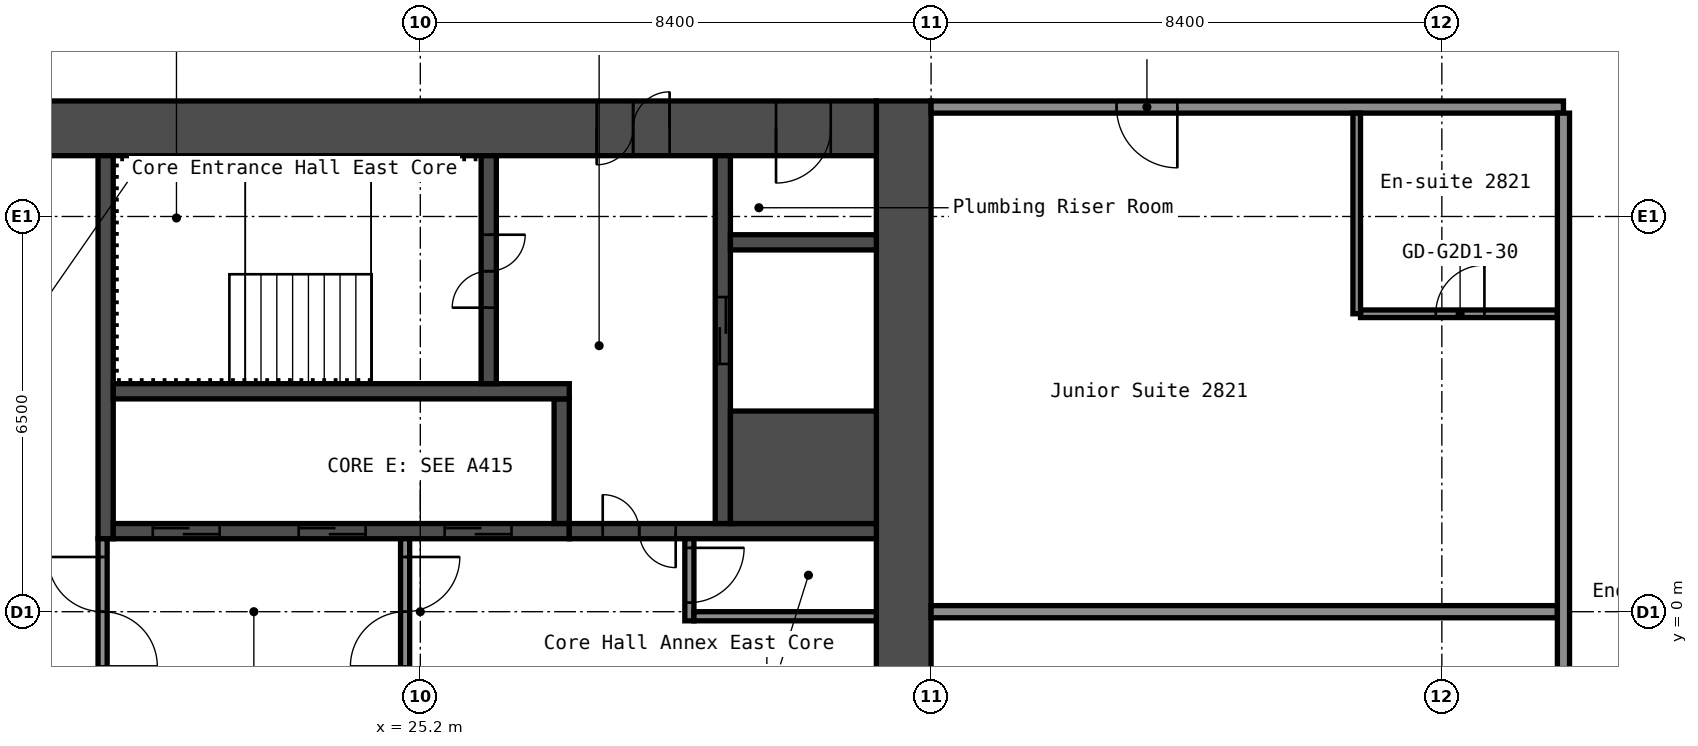
"""IFC4 building model, lengths in metres.
Left out: names, types, materials, properties, quantities, classifications, styles, units other than length and angle.
Written with IfcOpenShell. Run it as: python <this file> out.ifc"""

import sys

from ifc_helpers import new_model, si_unit, direction, frame, frame_2d, origin, place, context, subcontext, project, spatial, rectangle, extrude, element, fill, save


model = new_model("IFC4")
c1 = context("Model", 3, precision=1e-05, world=origin(), true_north=direction((0.0, 1.0)))
c2 = subcontext(c1, "Body", "Model", "MODEL_VIEW")
j1 = project(units=[si_unit("LENGTHUNIT", "METRE"), si_unit("PLANEANGLEUNIT", "RADIAN")], contexts=[c1])
p1 = place(None, origin())
s1 = spatial("IfcSite", under=j1, at=p1, CompositionType="ELEMENT")
p2 = place(p1, origin())
s2 = spatial("IfcBuilding", under=s1, at=p2, CompositionType="ELEMENT")
p3 = place(p2, frame((0.0, 0.0, 101.0)))
s3 = spatial("IfcBuildingStorey", under=s2, at=p3, CompositionType="ELEMENT", Elevation=101.0)
p4 = place(p3, frame((33.15, -8.4, 0.0), z_axis=(0.0, 0.0, 1.0), x_axis=(0.0, 1.0, 0.0)))
e1 = element("IfcWall", 1, at=p4, inside=s3, PredefinedType="SHEAR", context=c2, shape_type="SweptSolid", body=[
    extrude(rectangle(XDim=16.8, YDim=0.9, at=frame_2d((8.4, 0.0))), origin(), (0.0, 0.0, 1.0), 2.8),
])
p5 = place(p3, frame((17.7, 7.95, 0.0), z_axis=(0.0, 0.0, 1.0), x_axis=(1.0, 0.0, 0.0)))
e2 = element("IfcWall", 2, at=p5, inside=s3, PredefinedType="SHEAR", context=c2, shape_type="SweptSolid", body=[
    extrude(rectangle(XDim=15.0, YDim=0.9, at=frame_2d((7.5, 0.0))), origin(), (0.0, 0.0, 1.0), 2.8),
])
p6 = place(p5, frame((10.4, 0.0, 0.0)))
e3 = element("IfcOpeningElement", 3, at=p6, cuts=e2, PredefinedType="OPENING", context=c2, shape_type="SweptSolid", body=[
    extrude(rectangle(XDim=1.2, YDim=2.1, at=frame_2d((0.6, 1.05))), frame((0.0, 0.46, 0.0), z_axis=(0.0, -1.0, 0.0), x_axis=(1.0, 0.0, 0.0)), (0.0, 0.0, 1.0), 0.92),
])
p7 = place(p5, frame((13.35, 0.0, 0.0)))
e4 = element("IfcOpeningElement", 4, at=p7, cuts=e2, PredefinedType="OPENING", context=c2, shape_type="SweptSolid", body=[
    extrude(rectangle(XDim=0.9, YDim=2.1, at=frame_2d((0.45, 1.05))), frame((0.0, 0.46, 0.0), z_axis=(0.0, -1.0, 0.0), x_axis=(1.0, 0.0, 0.0)), (0.0, 0.0, 1.0), 0.92),
])
p8 = place(p3, frame((20.025, 1.2, 0.0), z_axis=(0.0, 0.0, 1.0), x_axis=(0.0, 1.0, 0.0)))
e5 = element("IfcWall", 5, at=p8, inside=s3, PredefinedType="SHEAR", context=c2, shape_type="SweptSolid", body=[
    extrude(rectangle(XDim=6.3, YDim=0.25, at=frame_2d((3.15, 0.0))), origin(), (0.0, 0.0, 1.0), 2.8),
])
p9 = place(p3, frame((20.15, 1.325, 0.0), z_axis=(0.0, 0.0, 1.0), x_axis=(1.0, 0.0, 0.0)))
e6 = element("IfcWall", 6, at=p9, inside=s3, PredefinedType="SHEAR", context=c2, shape_type="SweptSolid", body=[
    extrude(rectangle(XDim=7.5, YDim=0.25, at=frame_2d((3.75, 0.0))), origin(), (0.0, 0.0, 1.0), 2.8),
])
p10 = place(p9, frame((0.65, 0.0, 0.0)))
e7 = element("IfcOpeningElement", 7, at=p10, cuts=e6, PredefinedType="OPENING", context=c2, shape_type="SweptSolid", body=[
    extrude(rectangle(XDim=1.1, YDim=2.1, at=frame_2d((0.55, 1.05))), frame((0.0, 0.135, 0.0), z_axis=(0.0, -1.0, 0.0), x_axis=(1.0, 0.0, 0.0)), (0.0, 0.0, 1.0), 0.27),
])
p11 = place(p9, frame((3.05, 0.0, 0.0)))
e8 = element("IfcOpeningElement", 8, at=p11, cuts=e6, PredefinedType="OPENING", context=c2, shape_type="SweptSolid", body=[
    extrude(rectangle(XDim=1.1, YDim=2.1, at=frame_2d((0.55, 1.05))), frame((0.0, 0.135, 0.0), z_axis=(0.0, -1.0, 0.0), x_axis=(1.0, 0.0, 0.0)), (0.0, 0.0, 1.0), 0.27),
])
p12 = place(p9, frame((5.45, 0.0, 0.0)))
e9 = element("IfcOpeningElement", 9, at=p12, cuts=e6, PredefinedType="OPENING", context=c2, shape_type="SweptSolid", body=[
    extrude(rectangle(XDim=1.1, YDim=2.1, at=frame_2d((0.55, 1.05))), frame((0.0, 0.135, 0.0), z_axis=(0.0, -1.0, 0.0), x_axis=(1.0, 0.0, 0.0)), (0.0, 0.0, 1.0), 0.27),
])
p13 = place(p3, frame((27.525, 1.45, 0.0), z_axis=(0.0, 0.0, 1.0), x_axis=(0.0, 1.0, 0.0)))
e10 = element("IfcWall", 10, at=p13, inside=s3, PredefinedType="SHEAR", context=c2, shape_type="SweptSolid", body=[
    extrude(rectangle(XDim=2.05, YDim=0.25, at=frame_2d((1.025, 0.0))), origin(), (0.0, 0.0, 1.0), 2.8),
])
p14 = place(p3, frame((20.15, 3.625, 0.0), z_axis=(0.0, 0.0, 1.0), x_axis=(1.0, 0.0, 0.0)))
e11 = element("IfcWall", 11, at=p14, inside=s3, PredefinedType="SHEAR", context=c2, shape_type="SweptSolid", body=[
    extrude(rectangle(XDim=7.5, YDim=0.25, at=frame_2d((3.75, 0.0))), origin(), (0.0, 0.0, 1.0), 2.8),
])
p15 = place(p3, frame((26.325, 3.75, 0.0), z_axis=(0.0, 0.0, 1.0), x_axis=(0.0, 1.0, 0.0)))
e12 = element("IfcWall", 12, at=p15, inside=s3, PredefinedType="SHEAR", context=c2, shape_type="SweptSolid", body=[
    extrude(rectangle(XDim=3.75, YDim=0.25, at=frame_2d((1.875, 0.0))), origin(), (0.0, 0.0, 1.0), 2.8),
])
p16 = place(p15, frame((1.25, 0.0, 0.0)))
e13 = element("IfcOpeningElement", 13, at=p16, cuts=e12, PredefinedType="OPENING", context=c2, shape_type="SweptSolid", body=[
    extrude(rectangle(XDim=1.2, YDim=2.1, at=frame_2d((0.6, 1.05))), frame((0.0, 0.135, 0.0), z_axis=(0.0, -1.0, 0.0), x_axis=(1.0, 0.0, 0.0)), (0.0, 0.0, 1.0), 0.27),
])
p17 = place(p3, frame((27.65, 1.325, 0.0), z_axis=(0.0, 0.0, 1.0), x_axis=(1.0, 0.0, 0.0)))
e14 = element("IfcWall", 14, at=p17, inside=s3, PredefinedType="SHEAR", context=c2, shape_type="SweptSolid", body=[
    extrude(rectangle(XDim=5.05, YDim=0.25, at=frame_2d((2.525, 0.0))), origin(), (0.0, 0.0, 1.0), 2.8),
])
p18 = place(p17, frame((0.55, 0.0, 0.0)))
e15 = element("IfcOpeningElement", 15, at=p18, cuts=e14, PredefinedType="OPENING", context=c2, shape_type="SweptSolid", body=[
    extrude(rectangle(XDim=1.2, YDim=2.1, at=frame_2d((0.6, 1.05))), frame((0.0, 0.135, 0.0), z_axis=(0.0, -1.0, 0.0), x_axis=(1.0, 0.0, 0.0)), (0.0, 0.0, 1.0), 0.27),
])
p19 = place(p3, frame((30.175, 1.45, 0.0), z_axis=(0.0, 0.0, 1.0), x_axis=(0.0, 1.0, 0.0)))
e16 = element("IfcWall", 16, at=p19, inside=s3, PredefinedType="SHEAR", context=c2, shape_type="SweptSolid", body=[
    extrude(rectangle(XDim=6.05, YDim=0.25, at=frame_2d((3.025, 0.0))), origin(), (0.0, 0.0, 1.0), 2.8),
])
p20 = place(p19, frame((2.625, 0.0, 0.0)))
e17 = element("IfcOpeningElement", 17, at=p20, cuts=e16, PredefinedType="OPENING", context=c2, shape_type="SweptSolid", body=[
    extrude(rectangle(XDim=1.1, YDim=2.1, at=frame_2d((0.55, 1.05))), frame((0.0, 0.135, 0.0), z_axis=(0.0, -1.0, 0.0), x_axis=(1.0, 0.0, 0.0)), (0.0, 0.0, 1.0), 0.27),
])
p21 = place(p3, frame((30.3, 2.375, 0.0), z_axis=(0.0, 0.0, 1.0), x_axis=(1.0, 0.0, 0.0)))
e18 = element("IfcWall", 18, at=p21, inside=s3, PredefinedType="SHEAR", context=c2, shape_type="SweptSolid", body=[
    extrude(rectangle(XDim=2.4, YDim=1.85, at=frame_2d((1.2, 0.0))), origin(), (0.0, 0.0, 1.0), 2.8),
])
p22 = place(p3, frame((30.3, 6.075, 0.0), z_axis=(0.0, 0.0, 1.0), x_axis=(1.0, 0.0, 0.0)))
e19 = element("IfcWall", 19, at=p22, inside=s3, PredefinedType="SHEAR", context=c2, shape_type="SweptSolid", body=[
    extrude(rectangle(XDim=2.4, YDim=0.25, at=frame_2d((1.2, 0.0))), origin(), (0.0, 0.0, 1.0), 2.8),
])
p23 = place(p3, frame((19.975, -1.2, 0.0), z_axis=(0.0, 0.0, 1.0), x_axis=(0.0, 1.0, 0.0)))
e20 = element("IfcWall", 20, at=p23, inside=s3, PredefinedType="PARTITIONING", context=c2, shape_type="SweptSolid", body=[
    extrude(rectangle(XDim=2.4, YDim=0.15, at=frame_2d((1.2, 0.0))), origin(), (0.0, 0.0, 1.0), 2.8),
])
p24 = place(p23, frame((0.3, 0.0, 0.0)))
e21 = element("IfcOpeningElement", 21, at=p24, cuts=e20, PredefinedType="OPENING", context=c2, shape_type="SweptSolid", body=[
    extrude(rectangle(XDim=1.8, YDim=2.1, at=frame_2d((0.9, 1.05))), frame((0.0, 0.085, 0.0), z_axis=(0.0, -1.0, 0.0), x_axis=(1.0, 0.0, 0.0)), (0.0, 0.0, 1.0), 0.17),
])
p25 = place(p3, frame((24.95, -1.2, 0.0), z_axis=(0.0, 0.0, 1.0), x_axis=(0.0, 1.0, 0.0)))
e22 = element("IfcWall", 22, at=p25, inside=s3, PredefinedType="PARTITIONING", context=c2, shape_type="SweptSolid", body=[
    extrude(rectangle(XDim=2.4, YDim=0.15, at=frame_2d((1.2, 0.0))), origin(), (0.0, 0.0, 1.0), 2.8),
])
p26 = place(p25, frame((0.3, 0.0, 0.0)))
e23 = element("IfcOpeningElement", 23, at=p26, cuts=e22, PredefinedType="OPENING", context=c2, shape_type="SweptSolid", body=[
    extrude(rectangle(XDim=1.8, YDim=2.1, at=frame_2d((0.9, 1.05))), frame((0.0, 0.085, 0.0), z_axis=(0.0, -1.0, 0.0), x_axis=(1.0, 0.0, 0.0)), (0.0, 0.0, 1.0), 0.17),
])
p27 = place(p3, frame((29.625, -0.15, 0.0), z_axis=(0.0, 0.0, 1.0), x_axis=(0.0, 1.0, 0.0)))
e24 = element("IfcWall", 24, at=p27, inside=s3, PredefinedType="PARTITIONING", context=c2, shape_type="SweptSolid", body=[
    extrude(rectangle(XDim=1.35, YDim=0.15, at=frame_2d((0.675, 0.0))), origin(), (0.0, 0.0, 1.0), 2.8),
])
p28 = place(p27, frame((0.3, 0.0, 0.0)))
e25 = element("IfcOpeningElement", 25, at=p28, cuts=e24, PredefinedType="OPENING", context=c2, shape_type="SweptSolid", body=[
    extrude(rectangle(XDim=0.9, YDim=2.1, at=frame_2d((0.45, 1.05))), frame((0.0, 0.085, 0.0), z_axis=(0.0, -1.0, 0.0), x_axis=(1.0, 0.0, 0.0)), (0.0, 0.0, 1.0), 0.17),
])
p29 = place(p3, frame((29.7, -0.075, 0.0), z_axis=(0.0, 0.0, 1.0), x_axis=(1.0, 0.0, 0.0)))
e26 = element("IfcWall", 26, at=p29, inside=s3, PredefinedType="PARTITIONING", context=c2, shape_type="SweptSolid", body=[
    extrude(rectangle(XDim=3.0, YDim=0.15, at=frame_2d((1.5, 0.0))), origin(), (0.0, 0.0, 1.0), 2.8),
])
p30 = place(p3, frame((33.6, 0.0, 0.0), z_axis=(0.0, 0.0, 1.0), x_axis=(1.0, 0.0, 0.0)))
e27 = element("IfcWall", 27, at=p30, inside=s3, PredefinedType="PARTITIONING", context=c2, shape_type="SweptSolid", body=[
    extrude(rectangle(XDim=10.3, YDim=0.2, at=frame_2d((5.15, 0.0))), origin(), (0.0, 0.0, 1.0), 2.8),
])
p31 = place(p3, frame((40.663, 4.9, 0.0), z_axis=(0.0, 0.0, 1.0), x_axis=(1.0, 0.0, 0.0)))
e28 = element("IfcWall", 28, at=p31, inside=s3, PredefinedType="PARTITIONING", context=c2, shape_type="SweptSolid", body=[
    extrude(rectangle(XDim=3.237, YDim=0.125, at=frame_2d((1.619, 0.0))), origin(), (0.0, 0.0, 1.0), 2.8),
])
p32 = place(p31, frame((1.238, 0.0, 0.0)))
e29 = element("IfcOpeningElement", 29, at=p32, cuts=e28, PredefinedType="OPENING", context=c2, shape_type="SweptSolid", body=[
    extrude(rectangle(XDim=0.8, YDim=2.1, at=frame_2d((0.4, 1.05))), frame((0.0, 0.073, 0.0), z_axis=(0.0, -1.0, 0.0), x_axis=(1.0, 0.0, 0.0)), (0.0, 0.0, 1.0), 0.145),
])
p33 = place(p3, frame((33.6, 8.3, 0.0), z_axis=(0.0, 0.0, 1.0), x_axis=(1.0, 0.0, 0.0)))
e30 = element("IfcWall", 30, at=p33, inside=s3, PredefinedType="PARTITIONING", context=c2, shape_type="SweptSolid", body=[
    extrude(rectangle(XDim=10.4, YDim=0.2, at=frame_2d((5.2, 0.0))), origin(), (0.0, 0.0, 1.0), 2.8),
])
p34 = place(p33, frame((3.05, 0.0, 0.0)))
e31 = element("IfcOpeningElement", 31, at=p34, cuts=e30, PredefinedType="OPENING", context=c2, shape_type="SweptSolid", body=[
    extrude(rectangle(XDim=1.0, YDim=2.1, at=frame_2d((0.5, 1.05))), frame((0.0, 0.11, 0.0), z_axis=(0.0, -1.0, 0.0), x_axis=(1.0, 0.0, 0.0)), (0.0, 0.0, 1.0), 0.22),
])
p35 = place(p3, frame((40.6, 4.9, 0.0), z_axis=(0.0, 0.0, 1.0), x_axis=(0.0, 1.0, 0.0)))
e32 = element("IfcWall", 32, at=p35, inside=s3, PredefinedType="PARTITIONING", context=c2, shape_type="SweptSolid", body=[
    extrude(rectangle(XDim=3.3, YDim=0.125, at=frame_2d((1.65, 0.0))), origin(), (0.0, 0.0, 1.0), 2.8),
])
p36 = place(p3, frame((44.0, -8.2, 0.0), z_axis=(0.0, 0.0, 1.0), x_axis=(0.0, 1.0, 0.0)))
e33 = element("IfcWall", 33, at=p36, inside=s3, PredefinedType="PARTITIONING", context=c2, shape_type="SweptSolid", body=[
    extrude(rectangle(XDim=16.4, YDim=0.2, at=frame_2d((8.2, 0.0))), origin(), (0.0, 0.0, 1.0), 2.8),
])
p37 = place(p6, origin())
e34 = element("IfcDoor", 34, at=p37, inside=s3, OperationType="DOUBLE_DOOR_SINGLE_SWING", PredefinedType="DOOR", context=c2, shape_type="SweptSolid", body=[
    extrude(rectangle(XDim=1.2, YDim=2.1, at=frame_2d((0.6, 1.05))), frame((0.0, 0.025, 0.0), z_axis=(0.0, -1.0, 0.0), x_axis=(1.0, 0.0, 0.0)), (0.0, 0.0, 1.0), 0.05),
])
fill(e3, e34)
p38 = place(p7, origin())
e35 = element("IfcDoor", 35, at=p38, inside=s3, OperationType="SINGLE_SWING_LEFT", PredefinedType="DOOR", context=c2, shape_type="SweptSolid", body=[
    extrude(rectangle(XDim=0.9, YDim=2.1, at=frame_2d((0.45, 1.05))), frame((0.0, 0.025, 0.0), z_axis=(0.0, -1.0, 0.0), x_axis=(1.0, 0.0, 0.0)), (0.0, 0.0, 1.0), 0.05),
])
fill(e4, e35)
p39 = place(p16, origin())
e36 = element("IfcDoor", 36, at=p39, inside=s3, OperationType="DOUBLE_DOOR_SINGLE_SWING", PredefinedType="DOOR", context=c2, shape_type="SweptSolid", body=[
    extrude(rectangle(XDim=1.2, YDim=2.1, at=frame_2d((0.6, 1.05))), frame((0.0, 0.025, 0.0), z_axis=(0.0, -1.0, 0.0), x_axis=(1.0, 0.0, 0.0)), (0.0, 0.0, 1.0), 0.05),
])
fill(e13, e36)
p40 = place(p18, origin())
e37 = element("IfcDoor", 37, at=p40, inside=s3, OperationType="DOUBLE_DOOR_SINGLE_SWING", PredefinedType="DOOR", context=c2, shape_type="SweptSolid", body=[
    extrude(rectangle(XDim=1.2, YDim=2.1, at=frame_2d((0.6, 1.05))), frame((0.0, 0.025, 0.0), z_axis=(0.0, -1.0, 0.0), x_axis=(1.0, 0.0, 0.0)), (0.0, 0.0, 1.0), 0.05),
])
fill(e15, e37)
p41 = place(p24, origin())
e38 = element("IfcDoor", 38, at=p41, inside=s3, OperationType="DOUBLE_DOOR_SINGLE_SWING", PredefinedType="DOOR", context=c2, shape_type="SweptSolid", body=[
    extrude(rectangle(XDim=1.8, YDim=2.1, at=frame_2d((0.9, 1.05))), frame((0.0, 0.025, 0.0), z_axis=(0.0, -1.0, 0.0), x_axis=(1.0, 0.0, 0.0)), (0.0, 0.0, 1.0), 0.05),
])
fill(e21, e38)
p42 = place(p26, origin())
e39 = element("IfcDoor", 39, at=p42, inside=s3, OperationType="DOUBLE_DOOR_SINGLE_SWING", PredefinedType="DOOR", context=c2, shape_type="SweptSolid", body=[
    extrude(rectangle(XDim=1.8, YDim=2.1, at=frame_2d((0.9, 1.05))), frame((0.0, 0.025, 0.0), z_axis=(0.0, -1.0, 0.0), x_axis=(1.0, 0.0, 0.0)), (0.0, 0.0, 1.0), 0.05),
])
fill(e23, e39)
p43 = place(p28, origin())
e40 = element("IfcDoor", 40, at=p43, inside=s3, OperationType="SINGLE_SWING_RIGHT", PredefinedType="DOOR", context=c2, shape_type="SweptSolid", body=[
    extrude(rectangle(XDim=0.9, YDim=2.1, at=frame_2d((0.45, 1.05))), frame((0.0, 0.025, 0.0), z_axis=(0.0, -1.0, 0.0), x_axis=(1.0, 0.0, 0.0)), (0.0, 0.0, 1.0), 0.05),
])
fill(e25, e40)
p44 = place(p10, origin())
e41 = element("IfcDoor", 41, at=p44, inside=s3, OperationType="DOUBLE_DOOR_SLIDING", PredefinedType="DOOR", context=c2, shape_type="SweptSolid", body=[
    extrude(rectangle(XDim=1.1, YDim=2.1, at=frame_2d((0.55, 1.05))), frame((0.0, 0.025, 0.0), z_axis=(0.0, -1.0, 0.0), x_axis=(1.0, 0.0, 0.0)), (0.0, 0.0, 1.0), 0.05),
])
fill(e7, e41)
p45 = place(p11, origin())
e42 = element("IfcDoor", 42, at=p45, inside=s3, OperationType="DOUBLE_DOOR_SLIDING", PredefinedType="DOOR", context=c2, shape_type="SweptSolid", body=[
    extrude(rectangle(XDim=1.1, YDim=2.1, at=frame_2d((0.55, 1.05))), frame((0.0, 0.025, 0.0), z_axis=(0.0, -1.0, 0.0), x_axis=(1.0, 0.0, 0.0)), (0.0, 0.0, 1.0), 0.05),
])
fill(e8, e42)
p46 = place(p12, origin())
e43 = element("IfcDoor", 43, at=p46, inside=s3, OperationType="DOUBLE_DOOR_SLIDING", PredefinedType="DOOR", context=c2, shape_type="SweptSolid", body=[
    extrude(rectangle(XDim=1.1, YDim=2.1, at=frame_2d((0.55, 1.05))), frame((0.0, 0.025, 0.0), z_axis=(0.0, -1.0, 0.0), x_axis=(1.0, 0.0, 0.0)), (0.0, 0.0, 1.0), 0.05),
])
fill(e9, e43)
p47 = place(p20, origin())
e44 = element("IfcDoor", 44, at=p47, inside=s3, OperationType="DOUBLE_DOOR_SLIDING", PredefinedType="DOOR", context=c2, shape_type="SweptSolid", body=[
    extrude(rectangle(XDim=1.1, YDim=2.1, at=frame_2d((0.55, 1.05))), frame((0.0, 0.025, 0.0), z_axis=(0.0, -1.0, 0.0), x_axis=(1.0, 0.0, 0.0)), (0.0, 0.0, 1.0), 0.05),
])
fill(e17, e44)
p48 = place(p32, origin())
e45 = element("IfcDoor", 45, at=p48, inside=s3, OperationType="SINGLE_SWING_LEFT", PredefinedType="DOOR", context=c2, shape_type="SweptSolid", body=[
    extrude(rectangle(XDim=0.8, YDim=2.1, at=frame_2d((0.4, 1.05))), frame((0.0, 0.025, 0.0), z_axis=(0.0, -1.0, 0.0), x_axis=(1.0, 0.0, 0.0)), (0.0, 0.0, 1.0), 0.05),
])
fill(e29, e45)
p49 = place(p34, origin())
e46 = element("IfcDoor", 46, at=p49, inside=s3, OperationType="SINGLE_SWING_RIGHT", PredefinedType="DOOR", context=c2, shape_type="SweptSolid", body=[
    extrude(rectangle(XDim=1.0, YDim=2.1, at=frame_2d((0.5, 1.05))), frame((0.0, 0.025, 0.0), z_axis=(0.0, -1.0, 0.0), x_axis=(1.0, 0.0, 0.0)), (0.0, 0.0, 1.0), 0.05),
])
fill(e31, e46)
save(model, sys.argv[1])
